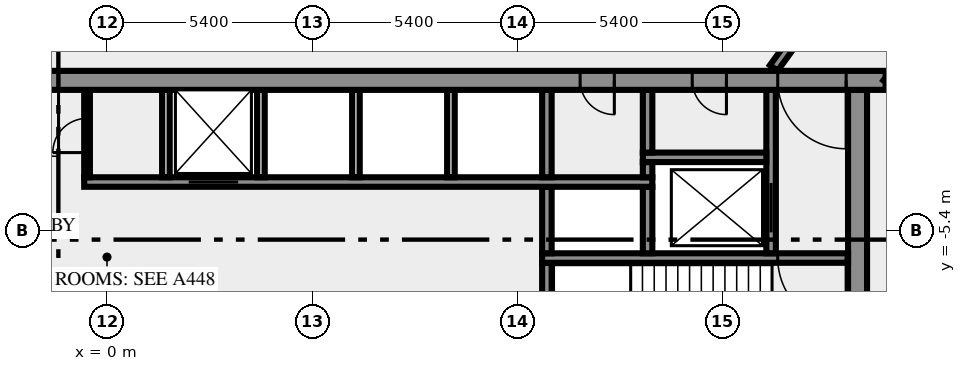
"""IFC4 building model, lengths in metres.
Left out: names, types, materials, properties, quantities, classifications, styles, units other than length and angle.
Written with IfcOpenShell. Run it as: python <this file> out.ifc"""

import sys

from ifc_helpers import new_model, si_unit, direction, frame, frame_2d, origin, place, context, subcontext, project, spatial, rectangle, extrude, element, fill, save


model = new_model("IFC4")
c1 = context("Model", 3, precision=1e-05, world=origin(), true_north=direction((0.0, 1.0)))
c2 = subcontext(c1, "Body", "Model", "MODEL_VIEW")
j1 = project(units=[si_unit("LENGTHUNIT", "METRE"), si_unit("PLANEANGLEUNIT", "RADIAN")], contexts=[c1])
p1 = place(None, origin())
s1 = spatial("IfcSite", under=j1, at=p1, CompositionType="ELEMENT")
p2 = place(p1, origin())
s2 = spatial("IfcBuilding", under=s1, at=p2, CompositionType="ELEMENT")
p3 = place(p2, frame((0.0, 0.0, 16.0)))
s3 = spatial("IfcBuildingStorey", under=s2, at=p3, CompositionType="ELEMENT", Elevation=16.0)
p4 = place(p3, frame((19.75, -10.5, 0.0), z_axis=(0.0, 0.0, 1.0), x_axis=(0.0, 1.0, 0.0)))
e1 = element("IfcWall", 1, at=p4, inside=s3, PredefinedType="SHEAR", context=c2, shape_type="SweptSolid", body=[
    extrude(rectangle(XDim=8.8, YDim=0.5, at=frame_2d((4.4, 0.0))), origin(), (0.0, 0.0, 1.0), 4.1),
])
p5 = place(p3, frame((11.575, -7.25, 0.0), z_axis=(0.0, 0.0, 1.0), x_axis=(0.0, 1.0, 0.0)))
e2 = element("IfcWall", 2, at=p5, inside=s3, PredefinedType="SHEAR", context=c2, shape_type="SweptSolid", body=[
    extrude(rectangle(XDim=1.0, YDim=0.25, at=frame_2d((0.5, 0.0))), origin(), (0.0, 0.0, 1.0), 4.1),
])
p6 = place(p3, frame((19.5, -6.125, 0.0), z_axis=(0.0, 0.0, 1.0), x_axis=(-1.0, 0.0, 0.0)))
e3 = element("IfcWall", 3, at=p6, inside=s3, PredefinedType="SHEAR", context=c2, shape_type="SweptSolid", body=[
    extrude(rectangle(XDim=8.05, YDim=0.25, at=frame_2d((4.025, 0.0))), origin(), (0.0, 0.0, 1.0), 4.1),
])
p7 = place(p6, frame((0.05, 0.0, 0.0)))
e4 = element("IfcOpeningElement", 4, at=p7, cuts=e3, PredefinedType="OPENING", context=c2, shape_type="SweptSolid", body=[
    extrude(rectangle(XDim=1.8, YDim=2.1, at=frame_2d((0.9, 1.05))), frame((0.0, 0.135, 0.0), z_axis=(0.0, -1.0, 0.0), x_axis=(1.0, 0.0, 0.0)), (0.0, 0.0, 1.0), 0.27),
])
for number, where, z_axis, x_axis in (
    (5, (11.575, -6.0, 0.0), (0.0, 0.0, 1.0), (0.0, 1.0, 0.0)),
    (6, (14.225, -6.0, 0.0), (0.0, 0.0, 1.0), (0.0, 1.0, 0.0)),
):
    element("IfcWall", number, at=place(p3, frame(where, z_axis=z_axis, x_axis=x_axis)), inside=s3, PredefinedType="SHEAR", context=c2, shape_type="SweptSolid", body=[
        extrude(rectangle(XDim=1.75, YDim=0.25, at=frame_2d((0.875, 0.0))), origin(), (0.0, 0.0, 1.0), 4.1),
    ])
p8 = place(p3, frame((17.475, -6.0, 0.0), z_axis=(0.0, 0.0, 1.0), x_axis=(0.0, 1.0, 0.0)))
e7 = element("IfcWall", 7, at=p8, inside=s3, PredefinedType="SHEAR", context=c2, shape_type="SweptSolid", body=[
    extrude(rectangle(XDim=4.3, YDim=0.25, at=frame_2d((2.15, 0.0))), origin(), (0.0, 0.0, 1.0), 4.1),
])
p9 = place(p8, frame((0.55, 0.0, 0.0)))
e8 = element("IfcOpeningElement", 8, at=p9, cuts=e7, PredefinedType="OPENING", context=c2, shape_type="SweptSolid", body=[
    extrude(rectangle(XDim=1.3, YDim=2.1, at=frame_2d((0.65, 1.05))), frame((0.0, 0.135, 0.0), z_axis=(0.0, -1.0, 0.0), x_axis=(1.0, 0.0, 0.0)), (0.0, 0.0, 1.0), 0.27),
])
p10 = place(p3, frame((-0.6, -4.125, 0.0), z_axis=(0.0, 0.0, 1.0), x_axis=(1.0, 0.0, 0.0)))
e9 = element("IfcWall", 9, at=p10, inside=s3, PredefinedType="SHEAR", context=c2, shape_type="SweptSolid", body=[
    extrude(rectangle(XDim=14.95, YDim=0.25, at=frame_2d((7.475, 0.0))), origin(), (0.0, 0.0, 1.0), 4.1),
])
p11 = place(p10, frame((2.75, 0.0, 0.0)))
e10 = element("IfcOpeningElement", 10, at=p11, cuts=e9, PredefinedType="OPENING", context=c2, shape_type="SweptSolid", body=[
    extrude(rectangle(XDim=1.3, YDim=2.1, at=frame_2d((0.65, 1.05))), frame((0.0, 0.135, 0.0), z_axis=(0.0, -1.0, 0.0), x_axis=(1.0, 0.0, 0.0)), (0.0, 0.0, 1.0), 0.27),
])
p12 = place(p3, frame((-0.525, -4.0, 0.0), z_axis=(0.0, 0.0, 1.0), x_axis=(0.0, 1.0, 0.0)))
e11 = element("IfcWall", 11, at=p12, inside=s3, PredefinedType="PARTITIONING", context=c2, shape_type="SweptSolid", body=[
    extrude(rectangle(XDim=2.3, YDim=0.15, at=frame_2d((1.15, 0.0))), origin(), (0.0, 0.0, 1.0), 4.1),
])
p13 = place(p12, frame((0.65, 0.0, 0.0)))
e12 = element("IfcOpeningElement", 12, at=p13, cuts=e11, PredefinedType="OPENING", context=c2, shape_type="SweptSolid", body=[
    extrude(rectangle(XDim=0.9, YDim=2.1, at=frame_2d((0.45, 1.05))), frame((0.0, 0.085, 0.0), z_axis=(0.0, -1.0, 0.0), x_axis=(1.0, 0.0, 0.0)), (0.0, 0.0, 1.0), 0.17),
])
for number, where, z_axis, x_axis in (
    (13, (1.55, -4.0, 0.0), (0.0, 0.0, 1.0), (0.0, 1.0, 0.0)),
    (14, (4.05, -4.0, 0.0), (0.0, 0.0, 1.0), (0.0, 1.0, 0.0)),
    (15, (6.55, -4.0, 0.0), (0.0, 0.0, 1.0), (0.0, 1.0, 0.0)),
    (16, (9.05, -4.0, 0.0), (0.0, 0.0, 1.0), (0.0, 1.0, 0.0)),
):
    element("IfcWall", number, at=place(p3, frame(where, z_axis=z_axis, x_axis=x_axis)), inside=s3, PredefinedType="SOLIDWALL", context=c2, shape_type="SweptSolid", body=[
        extrude(rectangle(XDim=2.3, YDim=0.2, at=frame_2d((1.15, 0.0))), origin(), (0.0, 0.0, 1.0), 4.1),
    ])
p14 = place(p3, frame((11.575, -4.0, 0.0), z_axis=(0.0, 0.0, 1.0), x_axis=(0.0, 1.0, 0.0)))
e17 = element("IfcWall", 17, at=p14, inside=s3, PredefinedType="SHEAR", context=c2, shape_type="SweptSolid", body=[
    extrude(rectangle(XDim=2.3, YDim=0.25, at=frame_2d((1.15, 0.0))), origin(), (0.0, 0.0, 1.0), 4.1),
])
p15 = place(p3, frame((14.225, -4.0, 0.0), z_axis=(0.0, 0.0, 1.0), x_axis=(0.0, 1.0, 0.0)))
e18 = element("IfcWall", 18, at=p15, inside=s3, PredefinedType="SHEAR", context=c2, shape_type="SweptSolid", body=[
    extrude(rectangle(XDim=0.4, YDim=0.25, at=frame_2d((0.2, 0.0))), origin(), (0.0, 0.0, 1.0), 4.1),
])
p16 = place(p3, frame((14.1, -3.475, 0.0), z_axis=(0.0, 0.0, 1.0), x_axis=(1.0, 0.0, 0.0)))
e19 = element("IfcWall", 19, at=p16, inside=s3, PredefinedType="SHEAR", context=c2, shape_type="SweptSolid", body=[
    extrude(rectangle(XDim=3.25, YDim=0.25, at=frame_2d((1.625, 0.0))), origin(), (0.0, 0.0, 1.0), 4.1),
])
p17 = place(p3, frame((14.225, -3.35, 0.0), z_axis=(0.0, 0.0, 1.0), x_axis=(0.0, 1.0, 0.0)))
e20 = element("IfcWall", 20, at=p17, inside=s3, PredefinedType="SHEAR", context=c2, shape_type="SweptSolid", body=[
    extrude(rectangle(XDim=1.65, YDim=0.25, at=frame_2d((0.825, 0.0))), origin(), (0.0, 0.0, 1.0), 4.1),
])
p18 = place(p3, frame((20.49, -1.45, 0.0), z_axis=(0.0, 0.0, 1.0), x_axis=(-1.0, 0.0, 0.0)))
e21 = element("IfcWall", 21, at=p18, inside=s3, PredefinedType="SHEAR", context=c2, shape_type="SweptSolid", body=[
    extrude(rectangle(XDim=40.98, YDim=0.5, at=frame_2d((20.49, 0.0))), origin(), (0.0, 0.0, 1.0), 4.1),
])
p19 = place(p18, frame((38.14, 0.0, 0.0)))
e22 = element("IfcOpeningElement", 22, at=p19, cuts=e21, PredefinedType="OPENING", context=c2, shape_type="SweptSolid", body=[
    extrude(rectangle(XDim=1.8, YDim=2.1, at=frame_2d((0.9, 1.05))), frame((0.0, 0.26, 0.0), z_axis=(0.0, -1.0, 0.0), x_axis=(1.0, 0.0, 0.0)), (0.0, 0.0, 1.0), 0.52),
])
p20 = place(p18, frame((36.728, 0.0, 0.0)))
e23 = element("IfcOpeningElement", 23, at=p20, cuts=e21, PredefinedType="OPENING", context=c2, shape_type="SweptSolid", body=[
    extrude(rectangle(XDim=0.8, YDim=2.1, at=frame_2d((0.4, 1.05))), frame((0.0, 0.26, 0.0), z_axis=(0.0, -1.0, 0.0), x_axis=(1.0, 0.0, 0.0)), (0.0, 0.0, 1.0), 0.52),
])
p21 = place(p18, frame((35.153, 0.0, 0.0)))
e24 = element("IfcOpeningElement", 24, at=p21, cuts=e21, PredefinedType="OPENING", context=c2, shape_type="SweptSolid", body=[
    extrude(rectangle(XDim=0.8, YDim=2.1, at=frame_2d((0.4, 1.05))), frame((0.0, 0.26, 0.0), z_axis=(0.0, -1.0, 0.0), x_axis=(1.0, 0.0, 0.0)), (0.0, 0.0, 1.0), 0.52),
])
p22 = place(p18, frame((32.94, 0.0, 0.0)))
e25 = element("IfcOpeningElement", 25, at=p22, cuts=e21, PredefinedType="OPENING", context=c2, shape_type="SweptSolid", body=[
    extrude(rectangle(XDim=0.9, YDim=2.1, at=frame_2d((0.45, 1.05))), frame((0.0, 0.26, 0.0), z_axis=(0.0, -1.0, 0.0), x_axis=(1.0, 0.0, 0.0)), (0.0, 0.0, 1.0), 0.52),
])
p23 = place(p18, frame((21.765, 0.0, 0.0)))
e26 = element("IfcOpeningElement", 26, at=p23, cuts=e21, PredefinedType="OPENING", context=c2, shape_type="SweptSolid", body=[
    extrude(rectangle(XDim=2.0, YDim=2.1, at=frame_2d((1.0, 1.05))), frame((0.0, 0.26, 0.0), z_axis=(0.0, -1.0, 0.0), x_axis=(1.0, 0.0, 0.0)), (0.0, 0.0, 1.0), 0.52),
])
p24 = place(p18, frame((7.14, 0.0, 0.0)))
e27 = element("IfcOpeningElement", 27, at=p24, cuts=e21, PredefinedType="OPENING", context=c2, shape_type="SweptSolid", body=[
    extrude(rectangle(XDim=0.9, YDim=2.1, at=frame_2d((0.45, 1.05))), frame((0.0, 0.26, 0.0), z_axis=(0.0, -1.0, 0.0), x_axis=(1.0, 0.0, 0.0)), (0.0, 0.0, 1.0), 0.52),
])
p25 = place(p18, frame((4.19, 0.0, 0.0)))
e28 = element("IfcOpeningElement", 28, at=p25, cuts=e21, PredefinedType="OPENING", context=c2, shape_type="SweptSolid", body=[
    extrude(rectangle(XDim=0.9, YDim=2.1, at=frame_2d((0.45, 1.05))), frame((0.0, 0.26, 0.0), z_axis=(0.0, -1.0, 0.0), x_axis=(1.0, 0.0, 0.0)), (0.0, 0.0, 1.0), 0.52),
])
p26 = place(p18, frame((1.04, 0.0, 0.0)))
e29 = element("IfcOpeningElement", 29, at=p26, cuts=e21, PredefinedType="OPENING", context=c2, shape_type="SweptSolid", body=[
    extrude(rectangle(XDim=1.8, YDim=2.1, at=frame_2d((0.9, 1.05))), frame((0.0, 0.26, 0.0), z_axis=(0.0, -1.0, 0.0), x_axis=(1.0, 0.0, 0.0)), (0.0, 0.0, 1.0), 0.52),
])
p27 = place(p3, frame((49.869, 38.856, 0.0), z_axis=(0.0, 0.0, 1.0), x_axis=(-0.587784522481, -0.809017524614, 0.0)))
e30 = element("IfcWall", 30, at=p27, inside=s3, PredefinedType="SOLIDWALL", context=c2, shape_type="SweptSolid", body=[
    extrude(rectangle(XDim=49.912, YDim=0.25, at=frame_2d((24.956, 0.0))), origin(), (0.0, 0.0, 1.0), 4.1),
])
p28 = place(p27, frame((19.271, 0.0, 0.0)))
e31 = element("IfcOpeningElement", 31, at=p28, cuts=e30, PredefinedType="OPENING", context=c2, shape_type="SweptSolid", body=[
    extrude(rectangle(XDim=1.8, YDim=2.1, at=frame_2d((0.9, 1.05))), frame((0.0, 0.135, 0.0), z_axis=(0.0, -1.0, 0.0), x_axis=(1.0, 0.0, 0.0)), (0.0, 0.0, 1.0), 0.27),
])
p29 = place(p27, frame((26.596, 0.0, 0.0)))
e32 = element("IfcOpeningElement", 32, at=p29, cuts=e30, PredefinedType="OPENING", context=c2, shape_type="SweptSolid", body=[
    extrude(rectangle(XDim=0.9, YDim=2.1, at=frame_2d((0.45, 1.05))), frame((0.0, 0.135, 0.0), z_axis=(0.0, -1.0, 0.0), x_axis=(1.0, 0.0, 0.0)), (0.0, 0.0, 1.0), 0.27),
])
p30 = place(p27, frame((12.846, 0.0, 0.0)))
e33 = element("IfcOpeningElement", 33, at=p30, cuts=e30, PredefinedType="OPENING", context=c2, shape_type="SweptSolid", body=[
    extrude(rectangle(XDim=0.9, YDim=2.1, at=frame_2d((0.45, 1.05))), frame((0.0, 0.135, 0.0), z_axis=(0.0, -1.0, 0.0), x_axis=(1.0, 0.0, 0.0)), (0.0, 0.0, 1.0), 0.27),
])
p31 = place(p27, frame((39.788, 0.0, 0.0)))
e34 = element("IfcOpeningElement", 34, at=p31, cuts=e30, PredefinedType="OPENING", context=c2, shape_type="SweptSolid", body=[
    extrude(rectangle(XDim=1.8, YDim=2.1, at=frame_2d((0.9, 1.05))), frame((0.0, 0.135, 0.0), z_axis=(0.0, -1.0, 0.0), x_axis=(1.0, 0.0, 0.0)), (0.0, 0.0, 1.0), 0.27),
])
p32 = place(p3, frame((17.545, -1.125, 0.0), z_axis=(0.0, 0.0, 1.0), x_axis=(0.587786323093, 0.809016216391, 0.0)))
e35 = element("IfcWall", 35, at=p32, inside=s3, PredefinedType="SOLIDWALL", context=c2, shape_type="SweptSolid", body=[
    extrude(rectangle(XDim=33.493, YDim=0.25, at=frame_2d((16.747, 0.0))), origin(), (0.0, 0.0, 1.0), 4.1),
])
p33 = place(p32, frame((25.608, 0.0, 0.0)))
e36 = element("IfcOpeningElement", 36, at=p33, cuts=e35, PredefinedType="OPENING", context=c2, shape_type="SweptSolid", body=[
    extrude(rectangle(XDim=0.9, YDim=2.1, at=frame_2d((0.45, 1.05))), frame((0.0, 0.135, 0.0), z_axis=(0.0, -1.0, 0.0), x_axis=(1.0, 0.0, 0.0)), (0.0, 0.0, 1.0), 0.27),
])
p34 = place(p32, frame((18.858, 0.0, 0.0)))
e37 = element("IfcOpeningElement", 37, at=p34, cuts=e35, PredefinedType="OPENING", context=c2, shape_type="SweptSolid", body=[
    extrude(rectangle(XDim=0.9, YDim=2.1, at=frame_2d((0.45, 1.05))), frame((0.0, 0.135, 0.0), z_axis=(0.0, -1.0, 0.0), x_axis=(1.0, 0.0, 0.0)), (0.0, 0.0, 1.0), 0.27),
])
p35 = place(p32, frame((27.208, 0.0, 0.0)))
e38 = element("IfcOpeningElement", 38, at=p35, cuts=e35, PredefinedType="OPENING", context=c2, shape_type="SweptSolid", body=[
    extrude(rectangle(XDim=0.9, YDim=2.1, at=frame_2d((0.45, 1.05))), frame((0.0, 0.135, 0.0), z_axis=(0.0, -1.0, 0.0), x_axis=(1.0, 0.0, 0.0)), (0.0, 0.0, 1.0), 0.27),
])
p36 = place(p7, origin())
e39 = element("IfcDoor", 39, at=p36, inside=s3, OperationType="DOUBLE_DOOR_SINGLE_SWING", PredefinedType="DOOR", context=c2, shape_type="SweptSolid", body=[
    extrude(rectangle(XDim=1.8, YDim=2.1, at=frame_2d((0.9, 1.05))), frame((0.0, 0.025, 0.0), z_axis=(0.0, -1.0, 0.0), x_axis=(1.0, 0.0, 0.0)), (0.0, 0.0, 1.0), 0.05),
])
fill(e4, e39)
p37 = place(p9, origin())
e40 = element("IfcDoor", 40, at=p37, inside=s3, OperationType="DOUBLE_DOOR_SLIDING", PredefinedType="DOOR", context=c2, shape_type="SweptSolid", body=[
    extrude(rectangle(XDim=1.3, YDim=2.1, at=frame_2d((0.65, 1.05))), frame((0.0, 0.025, 0.0), z_axis=(0.0, -1.0, 0.0), x_axis=(1.0, 0.0, 0.0)), (0.0, 0.0, 1.0), 0.05),
])
fill(e8, e40)
p38 = place(p11, origin())
e41 = element("IfcDoor", 41, at=p38, inside=s3, OperationType="DOUBLE_DOOR_SLIDING", PredefinedType="DOOR", context=c2, shape_type="SweptSolid", body=[
    extrude(rectangle(XDim=1.3, YDim=2.1, at=frame_2d((0.65, 1.05))), frame((0.0, 0.025, 0.0), z_axis=(0.0, -1.0, 0.0), x_axis=(1.0, 0.0, 0.0)), (0.0, 0.0, 1.0), 0.05),
])
fill(e10, e41)
p39 = place(p13, origin())
e42 = element("IfcDoor", 42, at=p39, inside=s3, OperationType="SINGLE_SWING_LEFT", PredefinedType="DOOR", context=c2, shape_type="SweptSolid", body=[
    extrude(rectangle(XDim=0.9, YDim=2.1, at=frame_2d((0.45, 1.05))), frame((0.0, 0.025, 0.0), z_axis=(0.0, -1.0, 0.0), x_axis=(1.0, 0.0, 0.0)), (0.0, 0.0, 1.0), 0.05),
])
fill(e12, e42)
p40 = place(p23, origin())
e43 = element("IfcDoor", 43, at=p40, inside=s3, OperationType="DOUBLE_DOOR_SINGLE_SWING", PredefinedType="DOOR", context=c2, shape_type="SweptSolid", body=[
    extrude(rectangle(XDim=2.0, YDim=2.1, at=frame_2d((1.0, 1.05))), frame((0.0, 0.025, 0.0), z_axis=(0.0, -1.0, 0.0), x_axis=(1.0, 0.0, 0.0)), (0.0, 0.0, 1.0), 0.05),
])
fill(e26, e43)
p41 = place(p24, origin())
e44 = element("IfcDoor", 44, at=p41, inside=s3, OperationType="SINGLE_SWING_LEFT", PredefinedType="DOOR", context=c2, shape_type="SweptSolid", body=[
    extrude(rectangle(XDim=0.9, YDim=2.1, at=frame_2d((0.45, 1.05))), frame((0.0, 0.025, 0.0), z_axis=(0.0, -1.0, 0.0), x_axis=(1.0, 0.0, 0.0)), (0.0, 0.0, 1.0), 0.05),
])
fill(e27, e44)
p42 = place(p25, origin())
e45 = element("IfcDoor", 45, at=p42, inside=s3, OperationType="SINGLE_SWING_LEFT", PredefinedType="DOOR", context=c2, shape_type="SweptSolid", body=[
    extrude(rectangle(XDim=0.9, YDim=2.1, at=frame_2d((0.45, 1.05))), frame((0.0, 0.025, 0.0), z_axis=(0.0, -1.0, 0.0), x_axis=(1.0, 0.0, 0.0)), (0.0, 0.0, 1.0), 0.05),
])
fill(e28, e45)
p43 = place(p26, origin())
e46 = element("IfcDoor", 46, at=p43, inside=s3, OperationType="DOUBLE_DOOR_SINGLE_SWING", PredefinedType="DOOR", context=c2, shape_type="SweptSolid", body=[
    extrude(rectangle(XDim=1.8, YDim=2.1, at=frame_2d((0.9, 1.05))), frame((0.0, 0.025, 0.0), z_axis=(0.0, -1.0, 0.0), x_axis=(1.0, 0.0, 0.0)), (0.0, 0.0, 1.0), 0.05),
])
fill(e29, e46)
save(model, sys.argv[1])
